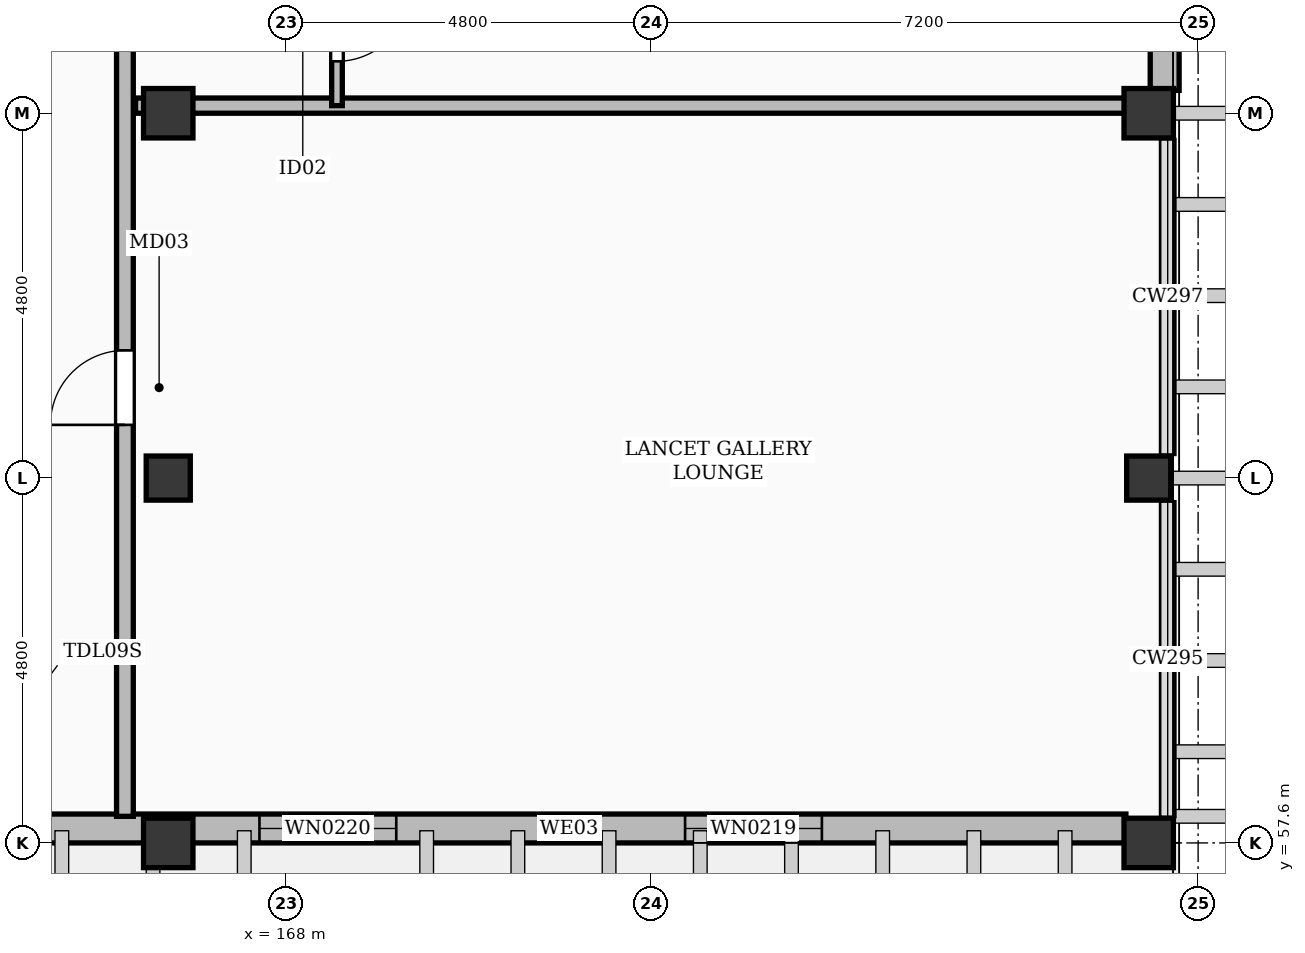
"""IFC4 building model, lengths in metres.
Left out: names, types, materials, properties, quantities, classifications, styles, units other than length and angle.
Written with IfcOpenShell. Run it as: python <this file> out.ifc"""

import sys

from ifc_helpers import new_model, si_unit, direction, frame, frame_2d, origin, origin_2d, place, context, subcontext, project, spatial, rectangle, extrude, element, fill, save


model = new_model("IFC4")
c1 = context("Model", 3, precision=1e-05, world=origin(), true_north=direction((0.0, 1.0)))
c2 = subcontext(c1, "Body", "Model", "MODEL_VIEW")
j1 = project(units=[si_unit("LENGTHUNIT", "METRE"), si_unit("PLANEANGLEUNIT", "RADIAN")], contexts=[c1])
p1 = place(None, origin())
s1 = spatial("IfcSite", under=j1, at=p1, CompositionType="ELEMENT")
p2 = place(p1, origin())
s2 = spatial("IfcBuilding", under=s1, at=p2, CompositionType="ELEMENT")
p3 = place(p2, frame((0.0, 0.0, 39.0)))
s3 = spatial("IfcBuildingStorey", under=s2, at=p3, CompositionType="ELEMENT", Elevation=39.0)
for number, where, z_axis, x_axis in (
    (1, (166.45, 57.6, 0.0), (0.0, 0.0, 1.0), (1.0, 0.0, 0.0)),
    (2, (166.45, 67.2, 0.0), (0.0, 0.0, 1.0), (1.0, 0.0, 0.0)),
    (3, (179.35, 57.6, 0.0), (0.0, 0.0, 1.0), (1.0, 0.0, 0.0)),
    (4, (179.35, 67.2, 0.0), (0.0, 0.0, 1.0), (1.0, 0.0, 0.0)),
):
    element("IfcColumn", number, at=place(p3, frame(where, z_axis=z_axis, x_axis=x_axis)), inside=s3, PredefinedType="COLUMN", context=c2, shape_type="SweptSolid", body=[
        extrude(rectangle(XDim=0.65, YDim=0.65, at=origin_2d()), origin(), (0.0, 0.0, 1.0), 3.6),
    ])
for number, where, z_axis, x_axis in (
    (5, (166.45, 62.4, 0.0), (0.0, 0.0, 1.0), (1.0, 0.0, 0.0)),
    (6, (179.35, 62.4, 0.0), (0.0, 0.0, 1.0), (1.0, 0.0, 0.0)),
):
    element("IfcColumn", number, at=place(p3, frame(where, z_axis=z_axis, x_axis=x_axis)), inside=s3, PredefinedType="COLUMN", context=c2, shape_type="SweptSolid", body=[
        extrude(rectangle(XDim=0.58, YDim=0.58, at=origin_2d()), origin(), (0.0, 0.0, 1.0), 3.6),
    ])
p4 = place(p3, frame((179.05, 57.79, 0.0), z_axis=(0.0, 0.0, 1.0), x_axis=(-1.0, 0.0, 0.0)))
e7 = element("IfcWall", 7, at=p4, inside=s3, PredefinedType="SOLIDWALL", context=c2, shape_type="SweptSolid", body=[
    extrude(rectangle(XDim=29.3, YDim=0.38, at=frame_2d((14.65, 0.0))), origin(), (0.0, 0.0, 1.0), 2.602),
])
p5 = place(p4, frame((14.5, 0.0, 0.0)))
e8 = element("IfcOpeningElement", 8, at=p5, cuts=e7, PredefinedType="OPENING", context=c2, shape_type="SweptSolid", body=[
    extrude(rectangle(XDim=1.6, YDim=2.25, at=frame_2d((0.8, 1.125))), frame((0.0, 0.202, 0.0), z_axis=(0.0, -1.0, 0.0), x_axis=(1.0, 0.0, 0.0)), (0.0, 0.0, 1.0), 0.404),
])
p6 = place(p4, frame((4.0, 0.0, 0.55)))
e9 = element("IfcOpeningElement", 9, at=p6, cuts=e7, PredefinedType="OPENING", context=c2, shape_type="SweptSolid", body=[
    extrude(rectangle(XDim=1.8, YDim=1.76, at=frame_2d((0.9, 0.88))), frame((0.0, 0.202, 0.0), z_axis=(0.0, -1.0, 0.0), x_axis=(1.0, 0.0, 0.0)), (0.0, 0.0, 1.0), 0.404),
])
p7 = place(p4, frame((9.6, 0.0, 0.55)))
e10 = element("IfcOpeningElement", 10, at=p7, cuts=e7, PredefinedType="OPENING", context=c2, shape_type="SweptSolid", body=[
    extrude(rectangle(XDim=1.8, YDim=1.76, at=frame_2d((0.9, 0.88))), frame((0.0, 0.202, 0.0), z_axis=(0.0, -1.0, 0.0), x_axis=(1.0, 0.0, 0.0)), (0.0, 0.0, 1.0), 0.404),
])
p8 = place(p4, frame((20.8, 0.0, 0.55)))
e11 = element("IfcOpeningElement", 11, at=p8, cuts=e7, PredefinedType="OPENING", context=c2, shape_type="SweptSolid", body=[
    extrude(rectangle(XDim=1.8, YDim=1.76, at=frame_2d((0.9, 0.88))), frame((0.0, 0.202, 0.0), z_axis=(0.0, -1.0, 0.0), x_axis=(1.0, 0.0, 0.0)), (0.0, 0.0, 1.0), 0.404),
])
p9 = place(p4, frame((25.4, 0.0, 0.55)))
e12 = element("IfcOpeningElement", 12, at=p9, cuts=e7, PredefinedType="OPENING", context=c2, shape_type="SweptSolid", body=[
    extrude(rectangle(XDim=1.8, YDim=1.76, at=frame_2d((0.9, 0.88))), frame((0.0, 0.202, 0.0), z_axis=(0.0, -1.0, 0.0), x_axis=(1.0, 0.0, 0.0)), (0.0, 0.0, 1.0), 0.404),
])
p10 = place(p3, frame((179.56, 71.735, 0.0), z_axis=(0.0, 0.0, 1.0), x_axis=(0.0, -1.0, 0.0)))
e13 = element("IfcWall", 13, at=p10, inside=s3, PredefinedType="SOLIDWALL", context=c2, shape_type="SweptSolid", body=[
    extrude(rectangle(XDim=4.235, YDim=0.38, at=frame_2d((2.118, 0.0))), origin(), (0.0, 0.0, 1.0), 2.602),
])
p11 = place(p10, frame((1.667, 0.0, 0.55)))
e14 = element("IfcOpeningElement", 14, at=p11, cuts=e13, PredefinedType="OPENING", context=c2, shape_type="SweptSolid", body=[
    extrude(rectangle(XDim=0.9, YDim=1.68, at=frame_2d((0.45, 0.84))), frame((0.0, 0.202, 0.0), z_axis=(0.0, -1.0, 0.0), x_axis=(1.0, 0.0, 0.0)), (0.0, 0.0, 1.0), 0.404),
])
p12 = place(p3, frame((165.88, 57.95, 0.0), z_axis=(0.0, 0.0, 1.0), x_axis=(0.0, 1.0, 0.0)))
e15 = element("IfcWall", 15, at=p12, inside=s3, PredefinedType="PARTITIONING", context=c2, shape_type="SweptSolid", body=[
    extrude(rectangle(XDim=67.7, YDim=0.22, at=frame_2d((33.85, 0.0))), origin(), (0.0, 0.0, 1.0), 2.602),
])
p13 = place(p12, frame((5.15, 0.0, 0.0)))
e16 = element("IfcOpeningElement", 16, at=p13, cuts=e15, PredefinedType="OPENING", context=c2, shape_type="SweptSolid", body=[
    extrude(rectangle(XDim=0.98, YDim=2.15, at=frame_2d((0.49, 1.075))), frame((0.0, 0.122, 0.0), z_axis=(0.0, -1.0, 0.0), x_axis=(1.0, 0.0, 0.0)), (0.0, 0.0, 1.0), 0.244),
])
p14 = place(p12, frame((11.838, 0.0, 0.0)))
e17 = element("IfcOpeningElement", 17, at=p14, cuts=e15, PredefinedType="OPENING", context=c2, shape_type="SweptSolid", body=[
    extrude(rectangle(XDim=1.5, YDim=2.3, at=frame_2d((0.75, 1.15))), frame((0.0, 0.122, 0.0), z_axis=(0.0, -1.0, 0.0), x_axis=(1.0, 0.0, 0.0)), (0.0, 0.0, 1.0), 0.244),
])
p15 = place(p12, frame((16.988, 0.0, 0.0)))
e18 = element("IfcOpeningElement", 18, at=p15, cuts=e15, PredefinedType="OPENING", context=c2, shape_type="SweptSolid", body=[
    extrude(rectangle(XDim=1.12, YDim=2.15, at=frame_2d((0.56, 1.075))), frame((0.0, 0.122, 0.0), z_axis=(0.0, -1.0, 0.0), x_axis=(1.0, 0.0, 0.0)), (0.0, 0.0, 1.0), 0.244),
])
p16 = place(p12, frame((21.788, 0.0, 0.0)))
e19 = element("IfcOpeningElement", 19, at=p16, cuts=e15, PredefinedType="OPENING", context=c2, shape_type="SweptSolid", body=[
    extrude(rectangle(XDim=1.28, YDim=2.16, at=frame_2d((0.64, 1.08))), frame((0.0, 0.122, 0.0), z_axis=(0.0, -1.0, 0.0), x_axis=(1.0, 0.0, 0.0)), (0.0, 0.0, 1.0), 0.244),
])
p17 = place(p12, frame((26.588, 0.0, 0.0)))
e20 = element("IfcOpeningElement", 20, at=p17, cuts=e15, PredefinedType="OPENING", context=c2, shape_type="SweptSolid", body=[
    extrude(rectangle(XDim=1.05, YDim=2.18, at=frame_2d((0.525, 1.09))), frame((0.0, 0.122, 0.0), z_axis=(0.0, -1.0, 0.0), x_axis=(1.0, 0.0, 0.0)), (0.0, 0.0, 1.0), 0.244),
])
p18 = place(p12, frame((31.388, 0.0, 0.0)))
e21 = element("IfcOpeningElement", 21, at=p18, cuts=e15, PredefinedType="OPENING", context=c2, shape_type="SweptSolid", body=[
    extrude(rectangle(XDim=1.08, YDim=2.25, at=frame_2d((0.54, 1.125))), frame((0.0, 0.122, 0.0), z_axis=(0.0, -1.0, 0.0), x_axis=(1.0, 0.0, 0.0)), (0.0, 0.0, 1.0), 0.244),
])
p19 = place(p12, frame((36.188, 0.0, 0.0)))
e22 = element("IfcOpeningElement", 22, at=p19, cuts=e15, PredefinedType="OPENING", context=c2, shape_type="SweptSolid", body=[
    extrude(rectangle(XDim=1.02, YDim=2.2, at=frame_2d((0.51, 1.1))), frame((0.0, 0.122, 0.0), z_axis=(0.0, -1.0, 0.0), x_axis=(1.0, 0.0, 0.0)), (0.0, 0.0, 1.0), 0.244),
])
p20 = place(p12, frame((40.638, 0.0, 0.0)))
e23 = element("IfcOpeningElement", 23, at=p20, cuts=e15, PredefinedType="OPENING", context=c2, shape_type="SweptSolid", body=[
    extrude(rectangle(XDim=1.5, YDim=2.3, at=frame_2d((0.75, 1.15))), frame((0.0, 0.122, 0.0), z_axis=(0.0, -1.0, 0.0), x_axis=(1.0, 0.0, 0.0)), (0.0, 0.0, 1.0), 0.244),
])
p21 = place(p12, frame((45.788, 0.0, 0.0)))
e24 = element("IfcOpeningElement", 24, at=p21, cuts=e15, PredefinedType="OPENING", context=c2, shape_type="SweptSolid", body=[
    extrude(rectangle(XDim=1.12, YDim=2.15, at=frame_2d((0.56, 1.075))), frame((0.0, 0.122, 0.0), z_axis=(0.0, -1.0, 0.0), x_axis=(1.0, 0.0, 0.0)), (0.0, 0.0, 1.0), 0.244),
])
p22 = place(p12, frame((50.588, 0.0, 0.0)))
e25 = element("IfcOpeningElement", 25, at=p22, cuts=e15, PredefinedType="OPENING", context=c2, shape_type="SweptSolid", body=[
    extrude(rectangle(XDim=1.28, YDim=2.16, at=frame_2d((0.64, 1.08))), frame((0.0, 0.122, 0.0), z_axis=(0.0, -1.0, 0.0), x_axis=(1.0, 0.0, 0.0)), (0.0, 0.0, 1.0), 0.244),
])
p23 = place(p12, frame((55.388, 0.0, 0.0)))
e26 = element("IfcOpeningElement", 26, at=p23, cuts=e15, PredefinedType="OPENING", context=c2, shape_type="SweptSolid", body=[
    extrude(rectangle(XDim=1.05, YDim=2.18, at=frame_2d((0.525, 1.09))), frame((0.0, 0.122, 0.0), z_axis=(0.0, -1.0, 0.0), x_axis=(1.0, 0.0, 0.0)), (0.0, 0.0, 1.0), 0.244),
])
p24 = place(p12, frame((60.188, 0.0, 0.0)))
e27 = element("IfcOpeningElement", 27, at=p24, cuts=e15, PredefinedType="OPENING", context=c2, shape_type="SweptSolid", body=[
    extrude(rectangle(XDim=1.08, YDim=2.25, at=frame_2d((0.54, 1.125))), frame((0.0, 0.122, 0.0), z_axis=(0.0, -1.0, 0.0), x_axis=(1.0, 0.0, 0.0)), (0.0, 0.0, 1.0), 0.244),
])
p25 = place(p12, frame((64.988, 0.0, 0.0)))
e28 = element("IfcOpeningElement", 28, at=p25, cuts=e15, PredefinedType="OPENING", context=c2, shape_type="SweptSolid", body=[
    extrude(rectangle(XDim=1.02, YDim=2.2, at=frame_2d((0.51, 1.1))), frame((0.0, 0.122, 0.0), z_axis=(0.0, -1.0, 0.0), x_axis=(1.0, 0.0, 0.0)), (0.0, 0.0, 1.0), 0.244),
])
p26 = place(p3, frame((166.02, 67.3, 0.0), z_axis=(0.0, 0.0, 1.0), x_axis=(1.0, 0.0, 0.0)))
e29 = element("IfcWall", 29, at=p26, inside=s3, PredefinedType="PARTITIONING", context=c2, shape_type="SweptSolid", body=[
    extrude(rectangle(XDim=13.23, YDim=0.2, at=frame_2d((6.615, 0.0))), origin(), (0.0, 0.0, 1.0), 2.602),
])
p27 = place(p3, frame((168.67, 67.3, 0.0), z_axis=(0.0, 0.0, 1.0), x_axis=(0.0, 1.0, 0.0)))
e30 = element("IfcWall", 30, at=p27, inside=s3, PredefinedType="PARTITIONING", context=c2, shape_type="SweptSolid", body=[
    extrude(rectangle(XDim=2.116, YDim=0.14, at=frame_2d((1.058, 0.0))), origin(), (0.0, 0.0, 1.0), 2.772),
])
p28 = place(p27, frame((0.583, 0.0, 0.0)))
e31 = element("IfcOpeningElement", 31, at=p28, cuts=e30, PredefinedType="OPENING", context=c2, shape_type="SweptSolid", body=[
    extrude(rectangle(XDim=0.96, YDim=2.12, at=frame_2d((0.48, 1.06))), frame((0.0, 0.082, 0.0), z_axis=(0.0, -1.0, 0.0), x_axis=(1.0, 0.0, 0.0)), (0.0, 0.0, 1.0), 0.164),
])
p29 = place(p6, origin())
e32 = element("IfcWindow", 32, at=p29, inside=s3, PartitioningType="SINGLE_PANEL", PredefinedType="WINDOW", context=c2, shape_type="SweptSolid", body=[
    extrude(rectangle(XDim=1.8, YDim=1.76, at=frame_2d((0.9, 0.88))), frame((0.0, 0.03, 0.0), z_axis=(0.0, -1.0, 0.0), x_axis=(1.0, 0.0, 0.0)), (0.0, 0.0, 1.0), 0.06),
])
fill(e9, e32)
p30 = place(p7, origin())
e33 = element("IfcWindow", 33, at=p30, inside=s3, PartitioningType="SINGLE_PANEL", PredefinedType="WINDOW", context=c2, shape_type="SweptSolid", body=[
    extrude(rectangle(XDim=1.8, YDim=1.76, at=frame_2d((0.9, 0.88))), frame((0.0, 0.03, 0.0), z_axis=(0.0, -1.0, 0.0), x_axis=(1.0, 0.0, 0.0)), (0.0, 0.0, 1.0), 0.06),
])
fill(e10, e33)
p31 = place(p13, origin())
e34 = element("IfcDoor", 34, at=p31, inside=s3, OperationType="SINGLE_SWING_LEFT", PredefinedType="DOOR", context=c2, shape_type="SweptSolid", body=[
    extrude(rectangle(XDim=0.98, YDim=2.15, at=frame_2d((0.49, 1.075))), frame((0.0, 0.025, 0.0), z_axis=(0.0, -1.0, 0.0), x_axis=(1.0, 0.0, 0.0)), (0.0, 0.0, 1.0), 0.05),
])
fill(e16, e34)
p32 = place(p28, frame((0.96, 0.0, 0.0), z_axis=(0.0, 0.0, 1.0), x_axis=(-1.0, 0.0, 0.0)))
e35 = element("IfcDoor", 35, at=p32, inside=s3, OperationType="SINGLE_SWING_RIGHT", PredefinedType="DOOR", context=c2, shape_type="SweptSolid", body=[
    extrude(rectangle(XDim=0.96, YDim=2.12, at=frame_2d((0.48, 1.06))), frame((0.0, 0.025, 0.0), z_axis=(0.0, -1.0, 0.0), x_axis=(1.0, 0.0, 0.0)), (0.0, 0.0, 1.0), 0.05),
])
fill(e31, e35)
save(model, sys.argv[1])
